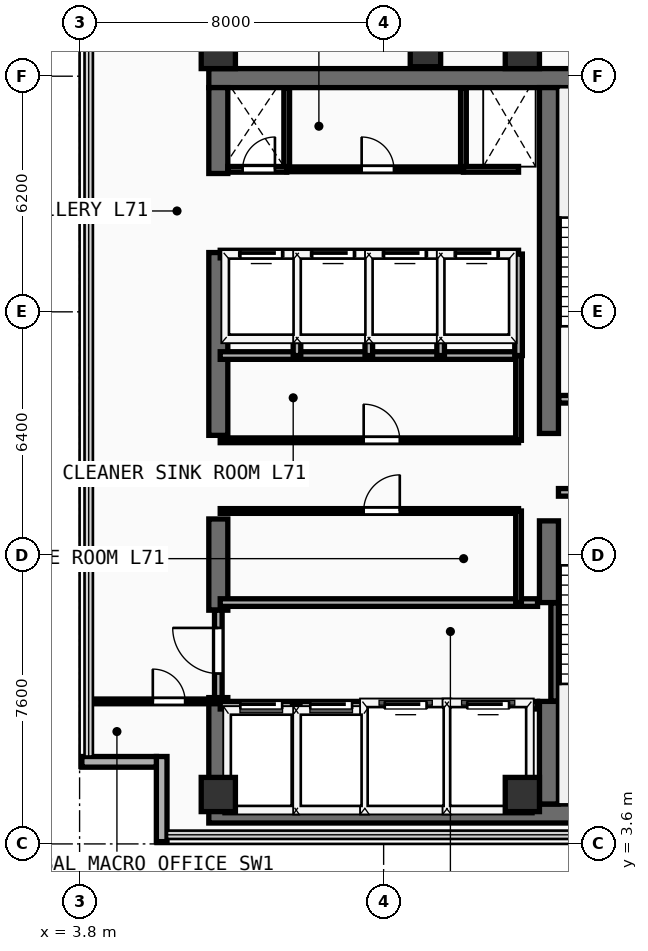
"""IFC4 building model, lengths in metres.
Left out: names, types, materials, properties, quantities, classifications, styles, units other than length and angle.
Written with IfcOpenShell. Run it as: python <this file> out.ifc"""

import sys

from ifc_helpers import new_model, si_unit, direction, frame, frame_2d, origin, origin_2d, place, context, subcontext, project, spatial, rectangle, extrude, element, fill, save


model = new_model("IFC4")
c1 = context("Model", 3, precision=1e-05, world=origin(), true_north=direction((0.0, 1.0)))
c2 = subcontext(c1, "Body", "Model", "MODEL_VIEW")
j1 = project(units=[si_unit("LENGTHUNIT", "METRE"), si_unit("PLANEANGLEUNIT", "RADIAN")], contexts=[c1])
p1 = place(None, origin())
s1 = spatial("IfcSite", under=j1, at=p1, CompositionType="ELEMENT")
p2 = place(p1, origin())
s2 = spatial("IfcBuilding", under=s1, at=p2, CompositionType="ELEMENT")
p3 = place(p2, frame((0.0, 0.0, 278.0)))
s3 = spatial("IfcBuildingStorey", under=s2, at=p3, CompositionType="ELEMENT", Elevation=278.0)
for number, where, z_axis, x_axis in (
    (1, (7.2, 4.4, 0.0), (0.0, 0.0, 1.0), (1.0, 0.0, 0.0)),
    (2, (7.2, 23.75, 0.0), (0.0, 0.0, 1.0), (1.0, 0.0, 0.0)),
):
    element("IfcWall", number, at=place(p3, frame(where, z_axis=z_axis, x_axis=x_axis)), inside=s3, PredefinedType="SHEAR", context=c2, shape_type="SweptSolid", body=[
        extrude(rectangle(XDim=13.85, YDim=0.5, at=frame_2d((6.925, 0.0))), origin(), (0.0, 0.0, 1.0), 3.56),
    ])
p4 = place(p3, frame((7.45, 4.65, 0.0), z_axis=(0.0, 0.0, 1.0), x_axis=(0.0, 1.0, 0.0)))
e3 = element("IfcWall", 3, at=p4, inside=s3, PredefinedType="SHEAR", context=c2, shape_type="SweptSolid", body=[
    extrude(rectangle(XDim=2.8, YDim=0.5, at=frame_2d((1.4, 0.0))), origin(), (0.0, 0.0, 1.0), 3.56),
])
p5 = place(p3, frame((7.45, 9.75, 0.0), z_axis=(0.0, 0.0, 1.0), x_axis=(0.0, 1.0, 0.0)))
e4 = element("IfcWall", 4, at=p5, inside=s3, PredefinedType="SHEAR", context=c2, shape_type="SweptSolid", body=[
    extrude(rectangle(XDim=2.4, YDim=0.5, at=frame_2d((1.2, 0.0))), origin(), (0.0, 0.0, 1.0), 3.56),
])
p6 = place(p3, frame((7.45, 14.35, 0.0), z_axis=(0.0, 0.0, 1.0), x_axis=(0.0, 1.0, 0.0)))
e5 = element("IfcWall", 5, at=p6, inside=s3, PredefinedType="SHEAR", context=c2, shape_type="SweptSolid", body=[
    extrude(rectangle(XDim=4.81, YDim=0.5, at=frame_2d((2.405, 0.0))), origin(), (0.0, 0.0, 1.0), 3.56),
])
p7 = place(p3, frame((7.45, 21.24, 0.0), z_axis=(0.0, 0.0, 1.0), x_axis=(0.0, 1.0, 0.0)))
e6 = element("IfcWall", 6, at=p7, inside=s3, PredefinedType="SHEAR", context=c2, shape_type="SweptSolid", body=[
    extrude(rectangle(XDim=2.26, YDim=0.5, at=frame_2d((1.13, 0.0))), origin(), (0.0, 0.0, 1.0), 3.56),
])
p8 = place(p3, frame((16.15, 4.65, 0.0), z_axis=(0.0, 0.0, 1.0), x_axis=(0.0, 1.0, 0.0)))
e7 = element("IfcWall", 7, at=p8, inside=s3, PredefinedType="SHEAR", context=c2, shape_type="SweptSolid", body=[
    extrude(rectangle(XDim=2.7, YDim=0.5, at=frame_2d((1.35, 0.0))), origin(), (0.0, 0.0, 1.0), 3.56),
])
p9 = place(p3, frame((16.15, 9.95, 0.0), z_axis=(0.0, 0.0, 1.0), x_axis=(0.0, 1.0, 0.0)))
e8 = element("IfcWall", 8, at=p9, inside=s3, PredefinedType="SHEAR", context=c2, shape_type="SweptSolid", body=[
    extrude(rectangle(XDim=2.15, YDim=0.5, at=frame_2d((1.075, 0.0))), origin(), (0.0, 0.0, 1.0), 3.56),
])
p10 = place(p3, frame((16.15, 14.4, 0.0), z_axis=(0.0, 0.0, 1.0), x_axis=(0.0, 1.0, 0.0)))
e9 = element("IfcWall", 9, at=p10, inside=s3, PredefinedType="SHEAR", context=c2, shape_type="SweptSolid", body=[
    extrude(rectangle(XDim=9.1, YDim=0.5, at=frame_2d((4.55, 0.0))), origin(), (0.0, 0.0, 1.0), 3.56),
])
for number, where, z_axis, x_axis in (
    (10, (7.45, 4.9, 0.0), (0.0, 0.0, 1.0), (1.0, 0.0, 0.0)),
    (11, (15.45, 4.9, 0.0), (0.0, 0.0, 1.0), (1.0, 0.0, 0.0)),
    (12, (7.45, 24.45, 0.0), (0.0, 0.0, 1.0), (1.0, 0.0, 0.0)),
    (13, (15.45, 24.45, 0.0), (0.0, 0.0, 1.0), (1.0, 0.0, 0.0)),
):
    element("IfcColumn", number, at=place(p3, frame(where, z_axis=z_axis, x_axis=x_axis)), inside=s3, PredefinedType="COLUMN", context=c2, shape_type="SweptSolid", body=[
        extrude(rectangle(XDim=0.9, YDim=0.9, at=origin_2d()), origin(), (0.0, 0.0, 1.0), 3.56),
    ])
p11 = place(p3, frame((12.9, 24.45, 0.0), z_axis=(0.0, 0.0, 1.0), x_axis=(1.0, 0.0, 0.0)))
e14 = element("IfcColumn", 14, at=p11, inside=s3, PredefinedType="COLUMN", context=c2, shape_type="SweptSolid", body=[
    extrude(rectangle(XDim=0.8, YDim=0.8, at=origin_2d()), origin(), (0.0, 0.0, 1.0), 3.56),
])
p12 = place(p3, frame((5.96, 3.66, 0.0), z_axis=(0.0, 0.0, 1.0), x_axis=(0.0, 1.0, 0.0)))
e15 = element("IfcWall", 15, at=p12, inside=s3, PredefinedType="SOLIDWALL", context=c2, shape_type="SweptSolid", body=[
    extrude(rectangle(XDim=2.24, YDim=0.28, at=frame_2d((1.12, 0.0))), origin(), (0.0, 0.0, 1.0), 3.56),
])
p13 = place(p3, frame((3.86, 5.76, 0.0), z_axis=(0.0, 0.0, 1.0), x_axis=(1.0, 0.0, 0.0)))
e16 = element("IfcWall", 16, at=p13, inside=s3, PredefinedType="SOLIDWALL", context=c2, shape_type="SweptSolid", body=[
    extrude(rectangle(XDim=1.96, YDim=0.28, at=frame_2d((0.98, 0.0))), origin(), (0.0, 0.0, 1.0), 3.56),
])
p14 = place(p3, frame((16.3, 7.36, 0.0), z_axis=(0.0, 0.0, 1.0), x_axis=(0.0, 1.0, 0.0)))
e17 = element("IfcWall", 17, at=p14, inside=s3, PredefinedType="SHEAR", context=c2, shape_type="SweptSolid", body=[
    extrude(rectangle(XDim=2.58, YDim=0.2, at=frame_2d((1.29, 0.0))), origin(), (0.0, 0.0, 1.0), 3.56),
])
p15 = place(p3, frame((16.4, 12.85, 0.0), z_axis=(0.0, 0.0, 1.0), x_axis=(1.0, 0.0, 0.0)))
e18 = element("IfcWall", 18, at=p15, inside=s3, PredefinedType="PARTITIONING", context=c2, shape_type="SweptSolid", body=[
    extrude(rectangle(XDim=3.96, YDim=0.2, at=frame_2d((1.98, 0.0))), origin(), (0.0, 0.0, 1.0), 3.56),
])
p16 = place(p15, frame((1.304, 0.0, 0.0)))
e19 = element("IfcOpeningElement", 19, at=p16, cuts=e18, PredefinedType="OPENING", context=c2, shape_type="SweptSolid", body=[
    extrude(rectangle(XDim=1.1, YDim=2.2, at=frame_2d((0.55, 1.1))), frame((0.0, 0.11, 0.0), z_axis=(0.0, -1.0, 0.0), x_axis=(1.0, 0.0, 0.0)), (0.0, 0.0, 1.0), 0.22),
])
p17 = place(p3, frame((16.41, 15.3, 0.0), z_axis=(0.0, 0.0, 1.0), x_axis=(1.0, 0.0, 0.0)))
e20 = element("IfcWall", 20, at=p17, inside=s3, PredefinedType="PARTITIONING", context=c2, shape_type="SweptSolid", body=[
    extrude(rectangle(XDim=3.95, YDim=0.2, at=frame_2d((1.975, 0.0))), origin(), (0.0, 0.0, 1.0), 3.56),
])
p18 = place(p17, frame((1.294, 0.0, 0.0)))
e21 = element("IfcOpeningElement", 21, at=p18, cuts=e20, PredefinedType="OPENING", context=c2, shape_type="SweptSolid", body=[
    extrude(rectangle(XDim=1.1, YDim=2.2, at=frame_2d((0.55, 1.1))), frame((0.0, 0.11, 0.0), z_axis=(0.0, -1.0, 0.0), x_axis=(1.0, 0.0, 0.0)), (0.0, 0.0, 1.0), 0.22),
])
p19 = place(p3, frame((7.5, 7.25, 0.0), z_axis=(0.0, 0.0, 1.0), x_axis=(1.0, 0.0, 0.0)))
e22 = element("IfcWall", 22, at=p19, inside=s3, PredefinedType="PARTITIONING", context=c2, shape_type="SweptSolid", body=[
    extrude(rectangle(XDim=8.35, YDim=0.2, at=frame_2d((4.175, 0.0))), origin(), (0.0, 0.0, 1.0), 3.56),
])
p20 = place(p19, frame((0.53, 0.0, 0.0)))
e23 = element("IfcOpeningElement", 23, at=p20, cuts=e22, PredefinedType="OPENING", context=c2, shape_type="SweptSolid", body=[
    extrude(rectangle(XDim=1.1, YDim=2.2, at=frame_2d((0.55, 1.1))), frame((0.0, 0.11, 0.0), z_axis=(0.0, -1.0, 0.0), x_axis=(1.0, 0.0, 0.0)), (0.0, 0.0, 1.0), 0.22),
])
p21 = place(p19, frame((2.37, 0.0, 0.0)))
e24 = element("IfcOpeningElement", 24, at=p21, cuts=e22, PredefinedType="OPENING", context=c2, shape_type="SweptSolid", body=[
    extrude(rectangle(XDim=1.1, YDim=2.2, at=frame_2d((0.55, 1.1))), frame((0.0, 0.11, 0.0), z_axis=(0.0, -1.0, 0.0), x_axis=(1.0, 0.0, 0.0)), (0.0, 0.0, 1.0), 0.22),
])
p22 = place(p19, frame((4.33, 0.0, 0.0)))
e25 = element("IfcOpeningElement", 25, at=p22, cuts=e22, PredefinedType="OPENING", context=c2, shape_type="SweptSolid", body=[
    extrude(rectangle(XDim=1.1, YDim=2.2, at=frame_2d((0.55, 1.1))), frame((0.0, 0.11, 0.0), z_axis=(0.0, -1.0, 0.0), x_axis=(1.0, 0.0, 0.0)), (0.0, 0.0, 1.0), 0.22),
])
p23 = place(p19, frame((6.5, 0.0, 0.0)))
e26 = element("IfcOpeningElement", 26, at=p23, cuts=e22, PredefinedType="OPENING", context=c2, shape_type="SweptSolid", body=[
    extrude(rectangle(XDim=1.1, YDim=2.2, at=frame_2d((0.55, 1.1))), frame((0.0, 0.11, 0.0), z_axis=(0.0, -1.0, 0.0), x_axis=(1.0, 0.0, 0.0)), (0.0, 0.0, 1.0), 0.22),
])
p24 = place(p3, frame((7.5, 9.95, 0.0), z_axis=(0.0, 0.0, 1.0), x_axis=(1.0, 0.0, 0.0)))
e27 = element("IfcWall", 27, at=p24, inside=s3, PredefinedType="PARTITIONING", context=c2, shape_type="SweptSolid", body=[
    extrude(rectangle(XDim=8.35, YDim=0.2, at=frame_2d((4.175, 0.0))), origin(), (0.0, 0.0, 1.0), 3.56),
])
for number, where, z_axis, x_axis in (
    (28, (9.5, 4.45, 0.0), (0.0, 0.0, 1.0), (0.0, 1.0, 0.0)),
    (29, (11.36, 4.45, 0.0), (0.0, 0.0, 1.0), (0.0, 1.0, 0.0)),
    (30, (13.46, 4.45, 0.0), (0.0, 0.0, 1.0), (0.0, 1.0, 0.0)),
):
    element("IfcWall", number, at=place(p3, frame(where, z_axis=z_axis, x_axis=x_axis)), inside=s3, PredefinedType="PARTITIONING", context=c2, shape_type="SweptSolid", body=[
        extrude(rectangle(XDim=2.8, YDim=0.2, at=frame_2d((1.4, 0.0))), origin(), (0.0, 0.0, 1.0), 3.56),
    ])
p25 = place(p3, frame((7.45, 7.45, 0.0), z_axis=(0.0, 0.0, 1.0), x_axis=(0.0, 1.0, 0.0)))
e31 = element("IfcWall", 31, at=p25, inside=s3, PredefinedType="PARTITIONING", context=c2, shape_type="SweptSolid", body=[
    extrude(rectangle(XDim=2.3, YDim=0.2, at=frame_2d((1.15, 0.0))), origin(), (0.0, 0.0, 1.0), 2.54),
])
p26 = place(p25, frame((0.633, 0.0, 0.0)))
e32 = element("IfcOpeningElement", 32, at=p26, cuts=e31, PredefinedType="OPENING", context=c2, shape_type="SweptSolid", body=[
    extrude(rectangle(XDim=1.2, YDim=2.25, at=frame_2d((0.6, 1.125))), frame((0.0, 0.11, 0.0), z_axis=(0.0, -1.0, 0.0), x_axis=(1.0, 0.0, 0.0)), (0.0, 0.0, 1.0), 0.22),
])
p27 = place(p3, frame((7.5, 16.45, 0.0), z_axis=(0.0, 0.0, 1.0), x_axis=(1.0, 0.0, 0.0)))
e33 = element("IfcWall", 33, at=p27, inside=s3, PredefinedType="PARTITIONING", context=c2, shape_type="SweptSolid", body=[
    extrude(rectangle(XDim=7.85, YDim=0.2, at=frame_2d((3.925, 0.0))), origin(), (0.0, 0.0, 1.0), 3.56),
])
p28 = place(p3, frame((7.5, 12.36, 0.0), z_axis=(0.0, 0.0, 1.0), x_axis=(1.0, 0.0, 0.0)))
e34 = element("IfcWall", 34, at=p28, inside=s3, PredefinedType="PARTITIONING", context=c2, shape_type="SweptSolid", body=[
    extrude(rectangle(XDim=7.85, YDim=0.125, at=frame_2d((3.925, 0.0))), origin(), (0.0, 0.0, 1.0), 3.56),
])
p29 = place(p28, frame((3.775, 0.0, 0.0)))
e35 = element("IfcOpeningElement", 35, at=p29, cuts=e34, PredefinedType="OPENING", context=c2, shape_type="SweptSolid", body=[
    extrude(rectangle(XDim=0.95, YDim=2.15, at=frame_2d((0.475, 1.075))), frame((0.0, 0.073, 0.0), z_axis=(0.0, -1.0, 0.0), x_axis=(1.0, 0.0, 0.0)), (0.0, 0.0, 1.0), 0.145),
])
p30 = place(p3, frame((7.5, 14.22, 0.0), z_axis=(0.0, 0.0, 1.0), x_axis=(1.0, 0.0, 0.0)))
e36 = element("IfcWall", 36, at=p30, inside=s3, PredefinedType="PARTITIONING", context=c2, shape_type="SweptSolid", body=[
    extrude(rectangle(XDim=7.85, YDim=0.125, at=frame_2d((3.925, 0.0))), origin(), (0.0, 0.0, 1.0), 3.56),
])
p31 = place(p30, frame((3.775, 0.0, 0.0)))
e37 = element("IfcOpeningElement", 37, at=p31, cuts=e36, PredefinedType="OPENING", context=c2, shape_type="SweptSolid", body=[
    extrude(rectangle(XDim=0.95, YDim=2.15, at=frame_2d((0.475, 1.075))), frame((0.0, 0.073, 0.0), z_axis=(0.0, -1.0, 0.0), x_axis=(1.0, 0.0, 0.0)), (0.0, 0.0, 1.0), 0.145),
])
p32 = place(p3, frame((15.35, 9.95, 0.0), z_axis=(0.0, 0.0, 1.0), x_axis=(0.0, 1.0, 0.0)))
e38 = element("IfcWall", 38, at=p32, inside=s3, PredefinedType="PARTITIONING", context=c2, shape_type="SweptSolid", body=[
    extrude(rectangle(XDim=2.41, YDim=0.15, at=frame_2d((1.205, 0.0))), origin(), (0.0, 0.0, 1.0), 3.56),
])
p33 = place(p3, frame((15.35, 14.22, 0.0), z_axis=(0.0, 0.0, 1.0), x_axis=(0.0, 1.0, 0.0)))
e39 = element("IfcWall", 39, at=p33, inside=s3, PredefinedType="PARTITIONING", context=c2, shape_type="SweptSolid", body=[
    extrude(rectangle(XDim=2.23, YDim=0.15, at=frame_2d((1.115, 0.0))), origin(), (0.0, 0.0, 1.0), 3.56),
])
p34 = place(p3, frame((7.5, 19.12, 0.0), z_axis=(0.0, 0.0, 1.0), x_axis=(1.0, 0.0, 0.0)))
e40 = element("IfcWall", 40, at=p34, inside=s3, PredefinedType="PARTITIONING", context=c2, shape_type="SweptSolid", body=[
    extrude(rectangle(XDim=7.85, YDim=0.2, at=frame_2d((3.925, 0.0))), origin(), (0.0, 0.0, 1.0), 3.56),
])
p35 = place(p34, frame((0.53, 0.0, 0.0)))
e41 = element("IfcOpeningElement", 41, at=p35, cuts=e40, PredefinedType="OPENING", context=c2, shape_type="SweptSolid", body=[
    extrude(rectangle(XDim=1.1, YDim=2.2, at=frame_2d((0.55, 1.1))), frame((0.0, 0.11, 0.0), z_axis=(0.0, -1.0, 0.0), x_axis=(1.0, 0.0, 0.0)), (0.0, 0.0, 1.0), 0.22),
])
p36 = place(p34, frame((2.42, 0.0, 0.0)))
e42 = element("IfcOpeningElement", 42, at=p36, cuts=e40, PredefinedType="OPENING", context=c2, shape_type="SweptSolid", body=[
    extrude(rectangle(XDim=1.1, YDim=2.2, at=frame_2d((0.55, 1.1))), frame((0.0, 0.11, 0.0), z_axis=(0.0, -1.0, 0.0), x_axis=(1.0, 0.0, 0.0)), (0.0, 0.0, 1.0), 0.22),
])
p37 = place(p34, frame((4.31, 0.0, 0.0)))
e43 = element("IfcOpeningElement", 43, at=p37, cuts=e40, PredefinedType="OPENING", context=c2, shape_type="SweptSolid", body=[
    extrude(rectangle(XDim=1.1, YDim=2.2, at=frame_2d((0.55, 1.1))), frame((0.0, 0.11, 0.0), z_axis=(0.0, -1.0, 0.0), x_axis=(1.0, 0.0, 0.0)), (0.0, 0.0, 1.0), 0.22),
])
p38 = place(p34, frame((6.2, 0.0, 0.0)))
e44 = element("IfcOpeningElement", 44, at=p38, cuts=e40, PredefinedType="OPENING", context=c2, shape_type="SweptSolid", body=[
    extrude(rectangle(XDim=1.1, YDim=2.2, at=frame_2d((0.55, 1.1))), frame((0.0, 0.11, 0.0), z_axis=(0.0, -1.0, 0.0), x_axis=(1.0, 0.0, 0.0)), (0.0, 0.0, 1.0), 0.22),
])
for number, where, z_axis, x_axis in (
    (45, (15.35, 16.45, 0.0), (0.0, 0.0, 1.0), (0.0, 1.0, 0.0)),
    (46, (9.52, 16.45, 0.0), (0.0, 0.0, 1.0), (0.0, 1.0, 0.0)),
    (47, (11.41, 16.45, 0.0), (0.0, 0.0, 1.0), (0.0, 1.0, 0.0)),
    (48, (13.3, 16.45, 0.0), (0.0, 0.0, 1.0), (0.0, 1.0, 0.0)),
):
    element("IfcWall", number, at=place(p3, frame(where, z_axis=z_axis, x_axis=x_axis)), inside=s3, PredefinedType="PARTITIONING", context=c2, shape_type="SweptSolid", body=[
        extrude(rectangle(XDim=2.67, YDim=0.2, at=frame_2d((1.335, 0.0))), origin(), (0.0, 0.0, 1.0), 3.56),
    ])
for number, where, z_axis, x_axis in (
    (49, (9.25, 21.35, 0.0), (0.0, 0.0, 1.0), (0.0, 1.0, 0.0)),
    (50, (13.9, 21.35, 0.0), (0.0, 0.0, 1.0), (0.0, 1.0, 0.0)),
):
    element("IfcWall", number, at=place(p3, frame(where, z_axis=z_axis, x_axis=x_axis)), inside=s3, PredefinedType="PARTITIONING", context=c2, shape_type="SweptSolid", body=[
        extrude(rectangle(XDim=2.13, YDim=0.15, at=frame_2d((1.065, 0.0))), origin(), (0.0, 0.0, 1.0), 3.56),
    ])
p39 = place(p3, frame((7.7, 21.35, 0.0), z_axis=(0.0, 0.0, 1.0), x_axis=(1.0, 0.0, 0.0)))
e51 = element("IfcWall", 51, at=p39, inside=s3, PredefinedType="PARTITIONING", context=c2, shape_type="SweptSolid", body=[
    extrude(rectangle(XDim=1.55, YDim=0.15, at=frame_2d((0.775, 0.0))), origin(), (0.0, 0.0, 1.0), 3.56),
])
p40 = place(p39, frame((0.39, 0.0, 0.0)))
e52 = element("IfcOpeningElement", 52, at=p40, cuts=e51, PredefinedType="OPENING", context=c2, shape_type="SweptSolid", body=[
    extrude(rectangle(XDim=0.85, YDim=2.15, at=frame_2d((0.425, 1.075))), frame((0.0, 0.085, 0.0), z_axis=(0.0, -1.0, 0.0), x_axis=(1.0, 0.0, 0.0)), (0.0, 0.0, 1.0), 0.17),
])
p41 = place(p3, frame((13.9, 21.35, 0.0), z_axis=(0.0, 0.0, 1.0), x_axis=(1.0, 0.0, 0.0)))
e53 = element("IfcWall", 53, at=p41, inside=s3, PredefinedType="PARTITIONING", context=c2, shape_type="SweptSolid", body=[
    extrude(rectangle(XDim=1.45, YDim=0.15, at=frame_2d((0.725, 0.0))), origin(), (0.0, 0.0, 1.0), 3.56),
])
p42 = place(p3, frame((9.25, 21.35, 0.0), z_axis=(0.0, 0.0, 1.0), x_axis=(1.0, 0.0, 0.0)))
e54 = element("IfcWall", 54, at=p42, inside=s3, PredefinedType="PARTITIONING", context=c2, shape_type="SweptSolid", body=[
    extrude(rectangle(XDim=4.65, YDim=0.125, at=frame_2d((2.325, 0.0))), origin(), (0.0, 0.0, 1.0), 3.56),
])
p43 = place(p42, frame((1.971, 0.0, 0.0)))
e55 = element("IfcOpeningElement", 55, at=p43, cuts=e54, PredefinedType="OPENING", context=c2, shape_type="SweptSolid", body=[
    extrude(rectangle(XDim=0.85, YDim=2.15, at=frame_2d((0.425, 1.075))), frame((0.0, 0.073, 0.0), z_axis=(0.0, -1.0, 0.0), x_axis=(1.0, 0.0, 0.0)), (0.0, 0.0, 1.0), 0.145),
])
p44 = place(p3, frame((4.04, 7.35, 0.0), z_axis=(0.0, 0.0, 1.0), x_axis=(1.0, 0.0, 0.0)))
e56 = element("IfcWall", 56, at=p44, inside=s3, PredefinedType="PARTITIONING", context=c2, shape_type="SweptSolid", body=[
    extrude(rectangle(XDim=3.36, YDim=0.125, at=frame_2d((1.68, 0.0))), origin(), (0.0, 0.0, 1.0), 3.56),
])
p45 = place(p44, frame((1.687, 0.0, 0.0)))
e57 = element("IfcOpeningElement", 57, at=p45, cuts=e56, PredefinedType="OPENING", context=c2, shape_type="SweptSolid", body=[
    extrude(rectangle(XDim=0.85, YDim=2.15, at=frame_2d((0.425, 1.075))), frame((0.0, 0.073, 0.0), z_axis=(0.0, -1.0, 0.0), x_axis=(1.0, 0.0, 0.0)), (0.0, 0.0, 1.0), 0.145),
])
p46 = place(p20, origin())
e58 = element("IfcDoor", 58, at=p46, inside=s3, OperationType="SLIDING_TO_LEFT", PredefinedType="DOOR", context=c2, shape_type="SweptSolid", body=[
    extrude(rectangle(XDim=1.1, YDim=2.2, at=frame_2d((0.55, 1.1))), frame((0.0, 0.025, 0.0), z_axis=(0.0, -1.0, 0.0), x_axis=(1.0, 0.0, 0.0)), (0.0, 0.0, 1.0), 0.05),
])
fill(e23, e58)
p47 = place(p21, origin())
e59 = element("IfcDoor", 59, at=p47, inside=s3, OperationType="SLIDING_TO_LEFT", PredefinedType="DOOR", context=c2, shape_type="SweptSolid", body=[
    extrude(rectangle(XDim=1.1, YDim=2.2, at=frame_2d((0.55, 1.1))), frame((0.0, 0.025, 0.0), z_axis=(0.0, -1.0, 0.0), x_axis=(1.0, 0.0, 0.0)), (0.0, 0.0, 1.0), 0.05),
])
fill(e24, e59)
p48 = place(p22, origin())
e60 = element("IfcDoor", 60, at=p48, inside=s3, OperationType="SLIDING_TO_LEFT", PredefinedType="DOOR", context=c2, shape_type="SweptSolid", body=[
    extrude(rectangle(XDim=1.1, YDim=2.2, at=frame_2d((0.55, 1.1))), frame((0.0, 0.025, 0.0), z_axis=(0.0, -1.0, 0.0), x_axis=(1.0, 0.0, 0.0)), (0.0, 0.0, 1.0), 0.05),
])
fill(e25, e60)
p49 = place(p23, origin())
e61 = element("IfcDoor", 61, at=p49, inside=s3, OperationType="SLIDING_TO_LEFT", PredefinedType="DOOR", context=c2, shape_type="SweptSolid", body=[
    extrude(rectangle(XDim=1.1, YDim=2.2, at=frame_2d((0.55, 1.1))), frame((0.0, 0.025, 0.0), z_axis=(0.0, -1.0, 0.0), x_axis=(1.0, 0.0, 0.0)), (0.0, 0.0, 1.0), 0.05),
])
fill(e26, e61)
p50 = place(p26, frame((1.2, 0.0, 0.0), z_axis=(0.0, 0.0, 1.0), x_axis=(-1.0, 0.0, 0.0)))
e62 = element("IfcDoor", 62, at=p50, inside=s3, OperationType="SINGLE_SWING_LEFT", PredefinedType="DOOR", context=c2, shape_type="SweptSolid", body=[
    extrude(rectangle(XDim=1.2, YDim=2.25, at=frame_2d((0.6, 1.125))), frame((0.0, 0.025, 0.0), z_axis=(0.0, -1.0, 0.0), x_axis=(1.0, 0.0, 0.0)), (0.0, 0.0, 1.0), 0.05),
])
fill(e32, e62)
p51 = place(p29, origin())
e63 = element("IfcDoor", 63, at=p51, inside=s3, OperationType="SINGLE_SWING_RIGHT", PredefinedType="DOOR", context=c2, shape_type="SweptSolid", body=[
    extrude(rectangle(XDim=0.95, YDim=2.15, at=frame_2d((0.475, 1.075))), frame((0.0, 0.025, 0.0), z_axis=(0.0, -1.0, 0.0), x_axis=(1.0, 0.0, 0.0)), (0.0, 0.0, 1.0), 0.05),
])
fill(e35, e63)
p52 = place(p31, origin())
e64 = element("IfcDoor", 64, at=p52, inside=s3, OperationType="SINGLE_SWING_LEFT", PredefinedType="DOOR", context=c2, shape_type="SweptSolid", body=[
    extrude(rectangle(XDim=0.95, YDim=2.15, at=frame_2d((0.475, 1.075))), frame((0.0, 0.025, 0.0), z_axis=(0.0, -1.0, 0.0), x_axis=(1.0, 0.0, 0.0)), (0.0, 0.0, 1.0), 0.05),
])
fill(e37, e64)
p53 = place(p35, origin())
e65 = element("IfcDoor", 65, at=p53, inside=s3, OperationType="SLIDING_TO_LEFT", PredefinedType="DOOR", context=c2, shape_type="SweptSolid", body=[
    extrude(rectangle(XDim=1.1, YDim=2.2, at=frame_2d((0.55, 1.1))), frame((0.0, 0.025, 0.0), z_axis=(0.0, -1.0, 0.0), x_axis=(1.0, 0.0, 0.0)), (0.0, 0.0, 1.0), 0.05),
])
fill(e41, e65)
p54 = place(p36, origin())
e66 = element("IfcDoor", 66, at=p54, inside=s3, OperationType="SLIDING_TO_LEFT", PredefinedType="DOOR", context=c2, shape_type="SweptSolid", body=[
    extrude(rectangle(XDim=1.1, YDim=2.2, at=frame_2d((0.55, 1.1))), frame((0.0, 0.025, 0.0), z_axis=(0.0, -1.0, 0.0), x_axis=(1.0, 0.0, 0.0)), (0.0, 0.0, 1.0), 0.05),
])
fill(e42, e66)
p55 = place(p37, origin())
e67 = element("IfcDoor", 67, at=p55, inside=s3, OperationType="SLIDING_TO_LEFT", PredefinedType="DOOR", context=c2, shape_type="SweptSolid", body=[
    extrude(rectangle(XDim=1.1, YDim=2.2, at=frame_2d((0.55, 1.1))), frame((0.0, 0.025, 0.0), z_axis=(0.0, -1.0, 0.0), x_axis=(1.0, 0.0, 0.0)), (0.0, 0.0, 1.0), 0.05),
])
fill(e43, e67)
p56 = place(p38, origin())
e68 = element("IfcDoor", 68, at=p56, inside=s3, OperationType="SLIDING_TO_LEFT", PredefinedType="DOOR", context=c2, shape_type="SweptSolid", body=[
    extrude(rectangle(XDim=1.1, YDim=2.2, at=frame_2d((0.55, 1.1))), frame((0.0, 0.025, 0.0), z_axis=(0.0, -1.0, 0.0), x_axis=(1.0, 0.0, 0.0)), (0.0, 0.0, 1.0), 0.05),
])
fill(e44, e68)
p57 = place(p40, origin())
e69 = element("IfcDoor", 69, at=p57, inside=s3, OperationType="SINGLE_SWING_RIGHT", PredefinedType="DOOR", context=c2, shape_type="SweptSolid", body=[
    extrude(rectangle(XDim=0.85, YDim=2.15, at=frame_2d((0.425, 1.075))), frame((0.0, 0.025, 0.0), z_axis=(0.0, -1.0, 0.0), x_axis=(1.0, 0.0, 0.0)), (0.0, 0.0, 1.0), 0.05),
])
fill(e52, e69)
p58 = place(p43, origin())
e70 = element("IfcDoor", 70, at=p58, inside=s3, OperationType="SINGLE_SWING_LEFT", PredefinedType="DOOR", context=c2, shape_type="SweptSolid", body=[
    extrude(rectangle(XDim=0.85, YDim=2.15, at=frame_2d((0.425, 1.075))), frame((0.0, 0.025, 0.0), z_axis=(0.0, -1.0, 0.0), x_axis=(1.0, 0.0, 0.0)), (0.0, 0.0, 1.0), 0.05),
])
fill(e55, e70)
p59 = place(p45, origin())
e71 = element("IfcDoor", 71, at=p59, inside=s3, OperationType="SINGLE_SWING_LEFT", PredefinedType="DOOR", context=c2, shape_type="SweptSolid", body=[
    extrude(rectangle(XDim=0.85, YDim=2.15, at=frame_2d((0.425, 1.075))), frame((0.0, 0.025, 0.0), z_axis=(0.0, -1.0, 0.0), x_axis=(1.0, 0.0, 0.0)), (0.0, 0.0, 1.0), 0.05),
])
fill(e57, e71)
save(model, sys.argv[1])
